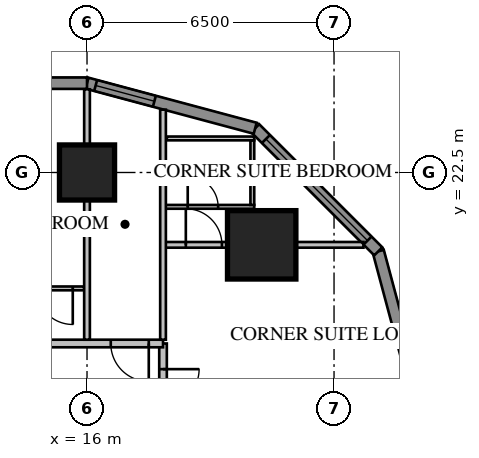
"""IFC4 building model, lengths in metres.
Left out: names, types, materials, properties, quantities, classifications, styles, units other than length and angle.
Written with IfcOpenShell. Run it as: python <this file> out.ifc"""

import sys

from ifc_helpers import new_model, si_unit, direction, frame, frame_2d, origin, origin_2d, place, context, subcontext, project, spatial, rectangle, extrude, element, fill, save


model = new_model("IFC4")
c1 = context("Model", 3, precision=1e-05, world=origin(), true_north=direction((0.0, 1.0)))
c2 = subcontext(c1, "Body", "Model", "MODEL_VIEW")
j1 = project(units=[si_unit("LENGTHUNIT", "METRE"), si_unit("PLANEANGLEUNIT", "RADIAN")], contexts=[c1])
p1 = place(None, origin())
s1 = spatial("IfcSite", under=j1, at=p1, CompositionType="ELEMENT")
p2 = place(p1, origin())
s2 = spatial("IfcBuilding", under=s1, at=p2, CompositionType="ELEMENT")
p3 = place(p2, frame((0.0, 0.0, 39.1)))
s3 = spatial("IfcBuildingStorey", under=s2, at=p3, CompositionType="ELEMENT", Elevation=39.1)
p4 = place(p3, frame((20.596, 20.596, 0.0), z_axis=(0.0, 0.0, 1.0), x_axis=(1.0, 0.0, 0.0)))
e1 = element("IfcColumn", 1, at=p4, inside=s3, PredefinedType="COLUMN", context=c2, shape_type="SweptSolid", body=[
    extrude(rectangle(XDim=1.8, YDim=1.8, at=origin_2d()), origin(), (0.0, 0.0, 1.0), 3.85),
])
p5 = place(p3, frame((16.0, 22.5, 0.0), z_axis=(0.0, 0.0, 1.0), x_axis=(1.0, 0.0, 0.0)))
e2 = element("IfcColumn", 2, at=p5, inside=s3, PredefinedType="COLUMN", context=c2, shape_type="SweptSolid", body=[
    extrude(rectangle(XDim=1.45, YDim=1.45, at=origin_2d()), origin(), (0.0, 0.0, 1.0), 3.85),
])
p6 = place(p3, frame((24.85, 16.0, 0.0), z_axis=(0.0, 0.0, 1.0), x_axis=(-0.258839972501, 0.965920218567, 0.0)))
e3 = element("IfcWall", 3, at=p6, inside=s3, PredefinedType="SOLIDWALL", context=c2, shape_type="SweptSolid", body=[
    extrude(rectangle(XDim=4.581, YDim=0.3, at=frame_2d((2.291, 0.0))), origin(), (0.0, 0.0, 1.0), 3.65),
])
p7 = place(p3, frame((23.664, 20.425, 0.0), z_axis=(0.0, 0.0, 1.0), x_axis=(-0.707106781187, 0.707106781187, 0.0)))
e4 = element("IfcWall", 4, at=p7, inside=s3, PredefinedType="SOLIDWALL", context=c2, shape_type="SweptSolid", body=[
    extrude(rectangle(XDim=4.581, YDim=0.3, at=frame_2d((2.291, 0.0))), origin(), (0.0, 0.0, 1.0), 3.65),
])
p8 = place(p7, frame((0.4, 0.0, 0.75)))
e5 = element("IfcOpeningElement", 5, at=p8, cuts=e4, PredefinedType="OPENING", context=c2, shape_type="SweptSolid", body=[
    extrude(rectangle(XDim=3.781, YDim=1.8, at=frame_2d((1.891, 0.9))), frame((0.0, 0.17, 0.0), z_axis=(0.0, -1.0, 0.0), x_axis=(1.0, 0.0, 0.0)), (0.0, 0.0, 1.0), 0.34),
])
p9 = place(p3, frame((20.425, 23.664, 0.0), z_axis=(0.0, 0.0, 1.0), x_axis=(-0.965920218567, 0.258839972501, 0.0)))
e6 = element("IfcWall", 6, at=p9, inside=s3, PredefinedType="SOLIDWALL", context=c2, shape_type="SweptSolid", body=[
    extrude(rectangle(XDim=4.581, YDim=0.3, at=frame_2d((2.291, 0.0))), origin(), (0.0, 0.0, 1.0), 3.65),
])
p10 = place(p9, frame((2.746, 0.0, 0.75)))
e7 = element("IfcOpeningElement", 7, at=p10, cuts=e6, PredefinedType="OPENING", context=c2, shape_type="SweptSolid", body=[
    extrude(rectangle(XDim=1.6, YDim=1.8, at=frame_2d((0.8, 0.9))), frame((0.0, 0.17, 0.0), z_axis=(0.0, -1.0, 0.0), x_axis=(1.0, 0.0, 0.0)), (0.0, 0.0, 1.0), 0.34),
])
p11 = place(p3, frame((16.0, 24.85, 0.0), z_axis=(0.0, 0.0, 1.0), x_axis=(-1.0, 0.0, 0.0)))
e8 = element("IfcWall", 8, at=p11, inside=s3, PredefinedType="SOLIDWALL", context=c2, shape_type="SweptSolid", body=[
    extrude(rectangle(XDim=32.0, YDim=0.3, at=frame_2d((16.0, 0.0))), origin(), (0.0, 0.0, 1.0), 3.65),
])
p12 = place(p11, frame((1.2, 0.0, 0.75)))
e9 = element("IfcOpeningElement", 9, at=p12, cuts=e8, PredefinedType="OPENING", context=c2, shape_type="SweptSolid", body=[
    extrude(rectangle(XDim=1.6, YDim=1.8, at=frame_2d((0.8, 0.9))), frame((0.0, 0.17, 0.0), z_axis=(0.0, -1.0, 0.0), x_axis=(1.0, 0.0, 0.0)), (0.0, 0.0, 1.0), 0.34),
])
p13 = place(p11, frame((5.2, 0.0, 0.75)))
e10 = element("IfcOpeningElement", 10, at=p13, cuts=e8, PredefinedType="OPENING", context=c2, shape_type="SweptSolid", body=[
    extrude(rectangle(XDim=1.6, YDim=1.8, at=frame_2d((0.8, 0.9))), frame((0.0, 0.17, 0.0), z_axis=(0.0, -1.0, 0.0), x_axis=(1.0, 0.0, 0.0)), (0.0, 0.0, 1.0), 0.34),
])
p14 = place(p11, frame((17.2, 0.0, 0.75)))
e11 = element("IfcOpeningElement", 11, at=p14, cuts=e8, PredefinedType="OPENING", context=c2, shape_type="SweptSolid", body=[
    extrude(rectangle(XDim=1.6, YDim=1.8, at=frame_2d((0.8, 0.9))), frame((0.0, 0.17, 0.0), z_axis=(0.0, -1.0, 0.0), x_axis=(1.0, 0.0, 0.0)), (0.0, 0.0, 1.0), 0.34),
])
p15 = place(p11, frame((21.2, 0.0, 0.75)))
e12 = element("IfcOpeningElement", 12, at=p15, cuts=e8, PredefinedType="OPENING", context=c2, shape_type="SweptSolid", body=[
    extrude(rectangle(XDim=1.6, YDim=1.8, at=frame_2d((0.8, 0.9))), frame((0.0, 0.17, 0.0), z_axis=(0.0, -1.0, 0.0), x_axis=(1.0, 0.0, 0.0)), (0.0, 0.0, 1.0), 0.34),
])
p16 = place(p11, frame((25.2, 0.0, 0.75)))
e13 = element("IfcOpeningElement", 13, at=p16, cuts=e8, PredefinedType="OPENING", context=c2, shape_type="SweptSolid", body=[
    extrude(rectangle(XDim=1.6, YDim=1.8, at=frame_2d((0.8, 0.9))), frame((0.0, 0.17, 0.0), z_axis=(0.0, -1.0, 0.0), x_axis=(1.0, 0.0, 0.0)), (0.0, 0.0, 1.0), 0.34),
])
p17 = place(p11, frame((29.2, 0.0, 0.75)))
e14 = element("IfcOpeningElement", 14, at=p17, cuts=e8, PredefinedType="OPENING", context=c2, shape_type="SweptSolid", body=[
    extrude(rectangle(XDim=1.6, YDim=1.8, at=frame_2d((0.8, 0.9))), frame((0.0, 0.17, 0.0), z_axis=(0.0, -1.0, 0.0), x_axis=(1.0, 0.0, 0.0)), (0.0, 0.0, 1.0), 0.34),
])
p18 = place(p11, frame((8.8, 0.0, 0.75)))
e15 = element("IfcOpeningElement", 15, at=p18, cuts=e8, PredefinedType="OPENING", context=c2, shape_type="SweptSolid", body=[
    extrude(rectangle(XDim=2.4, YDim=1.8, at=frame_2d((1.2, 0.9))), frame((0.0, 0.17, 0.0), z_axis=(0.0, -1.0, 0.0), x_axis=(1.0, 0.0, 0.0)), (0.0, 0.0, 1.0), 0.34),
])
p19 = place(p11, frame((13.812, 0.0, 0.0)))
e16 = element("IfcOpeningElement", 16, at=p19, cuts=e8, PredefinedType="OPENING", context=c2, shape_type="SweptSolid", body=[
    extrude(rectangle(XDim=1.0, YDim=2.4, at=frame_2d((0.5, 1.2))), frame((0.0, 0.17, 0.0), z_axis=(0.0, -1.0, 0.0), x_axis=(1.0, 0.0, 0.0)), (0.0, 0.0, 1.0), 0.34),
])
p20 = place(p3, frame((18.0, -18.0, 0.0), z_axis=(0.0, 0.0, 1.0), x_axis=(0.0, 1.0, 0.0)))
e17 = element("IfcWall", 17, at=p20, inside=s3, PredefinedType="PARTITIONING", context=c2, shape_type="SweptSolid", body=[
    extrude(rectangle(XDim=36.0, YDim=0.2, at=frame_2d((18.0, 0.0))), origin(), (0.0, 0.0, 1.0), 3.65),
])
p21 = place(p20, frame((10.4, 0.0, 0.0)))
e18 = element("IfcOpeningElement", 18, at=p21, cuts=e17, PredefinedType="OPENING", context=c2, shape_type="SweptSolid", body=[
    extrude(rectangle(XDim=1.0, YDim=2.1, at=frame_2d((0.5, 1.05))), frame((0.0, 0.12, 0.0), z_axis=(0.0, -1.0, 0.0), x_axis=(1.0, 0.0, 0.0)), (0.0, 0.0, 1.0), 0.24),
])
p22 = place(p20, frame((0.375, 0.0, 0.0)))
e19 = element("IfcOpeningElement", 19, at=p22, cuts=e17, PredefinedType="OPENING", context=c2, shape_type="SweptSolid", body=[
    extrude(rectangle(XDim=1.0, YDim=2.1, at=frame_2d((0.5, 1.05))), frame((0.0, 0.12, 0.0), z_axis=(0.0, -1.0, 0.0), x_axis=(1.0, 0.0, 0.0)), (0.0, 0.0, 1.0), 0.24),
])
p23 = place(p20, frame((34.375, 0.0, 0.0)))
e20 = element("IfcOpeningElement", 20, at=p23, cuts=e17, PredefinedType="OPENING", context=c2, shape_type="SweptSolid", body=[
    extrude(rectangle(XDim=0.95, YDim=2.1, at=frame_2d((0.475, 1.05))), frame((0.0, 0.12, 0.0), z_axis=(0.0, -1.0, 0.0), x_axis=(1.0, 0.0, 0.0)), (0.0, 0.0, 1.0), 0.24),
])
p24 = place(p3, frame((18.065, 21.596, 0.0), z_axis=(0.0, 0.0, 1.0), x_axis=(1.0, 0.0, 0.0)))
e21 = element("IfcWall", 21, at=p24, inside=s3, PredefinedType="PARTITIONING", context=c2, shape_type="SweptSolid", body=[
    extrude(rectangle(XDim=2.335, YDim=0.1, at=frame_2d((1.167, 0.0))), origin(), (0.0, 0.0, 1.0), 3.65),
])
p25 = place(p24, frame((0.585, 0.0, 0.0)))
e22 = element("IfcOpeningElement", 22, at=p25, cuts=e21, PredefinedType="OPENING", context=c2, shape_type="SweptSolid", body=[
    extrude(rectangle(XDim=0.8, YDim=2.1, at=frame_2d((0.4, 1.05))), frame((0.0, 0.07, 0.0), z_axis=(0.0, -1.0, 0.0), x_axis=(1.0, 0.0, 0.0)), (0.0, 0.0, 1.0), 0.14),
])
p26 = place(p3, frame((20.35, 21.646, 0.0), z_axis=(0.0, 0.0, 1.0), x_axis=(0.0, 1.0, 0.0)))
e23 = element("IfcWall", 23, at=p26, inside=s3, PredefinedType="PARTITIONING", context=c2, shape_type="SweptSolid", body=[
    extrude(rectangle(XDim=1.7, YDim=0.1, at=frame_2d((0.85, 0.0))), origin(), (0.0, 0.0, 1.0), 3.65),
])
p27 = place(p3, frame((18.1, 23.396, 0.0), z_axis=(0.0, 0.0, 1.0), x_axis=(1.0, 0.0, 0.0)))
e24 = element("IfcWall", 24, at=p27, inside=s3, PredefinedType="PARTITIONING", context=c2, shape_type="SweptSolid", body=[
    extrude(rectangle(XDim=2.3, YDim=0.1, at=frame_2d((1.15, 0.0))), origin(), (0.0, 0.0, 1.0), 3.65),
])
p28 = place(p3, frame((18.065, 20.596, 0.0), z_axis=(0.0, 0.0, 1.0), x_axis=(1.0, 0.0, 0.0)))
e25 = element("IfcWall", 25, at=p28, inside=s3, PredefinedType="PARTITIONING", context=c2, shape_type="SweptSolid", body=[
    extrude(rectangle(XDim=5.209, YDim=0.15, at=frame_2d((2.604, 0.0))), origin(), (0.0, 0.0, 1.0), 3.65),
])
p29 = place(p28, frame((0.535, 0.0, 0.0)))
e26 = element("IfcOpeningElement", 26, at=p29, cuts=e25, PredefinedType="OPENING", context=c2, shape_type="SweptSolid", body=[
    extrude(rectangle(XDim=0.95, YDim=2.1, at=frame_2d((0.475, 1.05))), frame((0.0, 0.095, 0.0), z_axis=(0.0, -1.0, 0.0), x_axis=(1.0, 0.0, 0.0)), (0.0, 0.0, 1.0), 0.19),
])
p30 = place(p3, frame((18.0, 18.0, 0.0), z_axis=(0.0, 0.0, 1.0), x_axis=(-1.0, 0.0, 0.0)))
e27 = element("IfcWall", 27, at=p30, inside=s3, PredefinedType="PARTITIONING", context=c2, shape_type="SweptSolid", body=[
    extrude(rectangle(XDim=36.0, YDim=0.2, at=frame_2d((18.0, 0.0))), origin(), (0.0, 0.0, 1.0), 3.65),
])
p31 = place(p30, frame((10.4, 0.0, 0.0)))
e28 = element("IfcOpeningElement", 28, at=p31, cuts=e27, PredefinedType="OPENING", context=c2, shape_type="SweptSolid", body=[
    extrude(rectangle(XDim=1.0, YDim=2.1, at=frame_2d((0.5, 1.05))), frame((0.0, 0.12, 0.0), z_axis=(0.0, -1.0, 0.0), x_axis=(1.0, 0.0, 0.0)), (0.0, 0.0, 1.0), 0.24),
])
p32 = place(p30, frame((0.375, 0.0, 0.0)))
e29 = element("IfcOpeningElement", 29, at=p32, cuts=e27, PredefinedType="OPENING", context=c2, shape_type="SweptSolid", body=[
    extrude(rectangle(XDim=1.0, YDim=2.1, at=frame_2d((0.5, 1.05))), frame((0.0, 0.12, 0.0), z_axis=(0.0, -1.0, 0.0), x_axis=(1.0, 0.0, 0.0)), (0.0, 0.0, 1.0), 0.24),
])
p33 = place(p30, frame((34.375, 0.0, 0.0)))
e30 = element("IfcOpeningElement", 30, at=p33, cuts=e27, PredefinedType="OPENING", context=c2, shape_type="SweptSolid", body=[
    extrude(rectangle(XDim=0.95, YDim=2.1, at=frame_2d((0.475, 1.05))), frame((0.0, 0.12, 0.0), z_axis=(0.0, -1.0, 0.0), x_axis=(1.0, 0.0, 0.0)), (0.0, 0.0, 1.0), 0.24),
])
p34 = place(p3, frame((15.925, 19.45, 0.0), z_axis=(0.0, 0.0, 1.0), x_axis=(-1.0, 0.0, 0.0)))
e31 = element("IfcWall", 31, at=p34, inside=s3, PredefinedType="PARTITIONING", context=c2, shape_type="SweptSolid", body=[
    extrude(rectangle(XDim=31.85, YDim=0.1, at=frame_2d((15.925, 0.0))), origin(), (0.0, 0.0, 1.0), 3.65),
])
p35 = place(p34, frame((10.125, 0.0, 0.0)))
e32 = element("IfcOpeningElement", 32, at=p35, cuts=e31, PredefinedType="OPENING", context=c2, shape_type="SweptSolid", body=[
    extrude(rectangle(XDim=1.0, YDim=2.1, at=frame_2d((0.5, 1.05))), frame((0.0, 0.07, 0.0), z_axis=(0.0, -1.0, 0.0), x_axis=(1.0, 0.0, 0.0)), (0.0, 0.0, 1.0), 0.14),
])
p36 = place(p34, frame((8.3, 0.0, 0.0)))
e33 = element("IfcOpeningElement", 33, at=p36, cuts=e31, PredefinedType="OPENING", context=c2, shape_type="SweptSolid", body=[
    extrude(rectangle(XDim=0.8, YDim=2.1, at=frame_2d((0.4, 1.05))), frame((0.0, 0.07, 0.0), z_axis=(0.0, -1.0, 0.0), x_axis=(1.0, 0.0, 0.0)), (0.0, 0.0, 1.0), 0.14),
])
p37 = place(p34, frame((0.3, 0.0, 0.0)))
e34 = element("IfcOpeningElement", 34, at=p37, cuts=e31, PredefinedType="OPENING", context=c2, shape_type="SweptSolid", body=[
    extrude(rectangle(XDim=0.95, YDim=2.1, at=frame_2d((0.475, 1.05))), frame((0.0, 0.07, 0.0), z_axis=(0.0, -1.0, 0.0), x_axis=(1.0, 0.0, 0.0)), (0.0, 0.0, 1.0), 0.14),
])
p38 = place(p34, frame((6.175, 0.0, 0.0)))
e35 = element("IfcOpeningElement", 35, at=p38, cuts=e31, PredefinedType="OPENING", context=c2, shape_type="SweptSolid", body=[
    extrude(rectangle(XDim=0.95, YDim=2.1, at=frame_2d((0.475, 1.05))), frame((0.0, 0.07, 0.0), z_axis=(0.0, -1.0, 0.0), x_axis=(1.0, 0.0, 0.0)), (0.0, 0.0, 1.0), 0.14),
])
p39 = place(p34, frame((16.3, 0.0, 0.0)))
e36 = element("IfcOpeningElement", 36, at=p39, cuts=e31, PredefinedType="OPENING", context=c2, shape_type="SweptSolid", body=[
    extrude(rectangle(XDim=0.95, YDim=2.1, at=frame_2d((0.475, 1.05))), frame((0.0, 0.07, 0.0), z_axis=(0.0, -1.0, 0.0), x_axis=(1.0, 0.0, 0.0)), (0.0, 0.0, 1.0), 0.14),
])
p40 = place(p34, frame((22.175, 0.0, 0.0)))
e37 = element("IfcOpeningElement", 37, at=p40, cuts=e31, PredefinedType="OPENING", context=c2, shape_type="SweptSolid", body=[
    extrude(rectangle(XDim=0.95, YDim=2.1, at=frame_2d((0.475, 1.05))), frame((0.0, 0.07, 0.0), z_axis=(0.0, -1.0, 0.0), x_axis=(1.0, 0.0, 0.0)), (0.0, 0.0, 1.0), 0.14),
])
p41 = place(p34, frame((24.3, 0.0, 0.0)))
e38 = element("IfcOpeningElement", 38, at=p41, cuts=e31, PredefinedType="OPENING", context=c2, shape_type="SweptSolid", body=[
    extrude(rectangle(XDim=0.95, YDim=2.1, at=frame_2d((0.475, 1.05))), frame((0.0, 0.07, 0.0), z_axis=(0.0, -1.0, 0.0), x_axis=(1.0, 0.0, 0.0)), (0.0, 0.0, 1.0), 0.14),
])
p42 = place(p34, frame((30.175, 0.0, 0.0)))
e39 = element("IfcOpeningElement", 39, at=p42, cuts=e31, PredefinedType="OPENING", context=c2, shape_type="SweptSolid", body=[
    extrude(rectangle(XDim=0.95, YDim=2.1, at=frame_2d((0.475, 1.05))), frame((0.0, 0.07, 0.0), z_axis=(0.0, -1.0, 0.0), x_axis=(1.0, 0.0, 0.0)), (0.0, 0.0, 1.0), 0.14),
])
p43 = place(p3, frame((18.0, 18.1, 0.0), z_axis=(0.0, 0.0, 1.0), x_axis=(0.0, 1.0, 0.0)))
e40 = element("IfcWall", 40, at=p43, inside=s3, PredefinedType="PARTITIONING", context=c2, shape_type="SweptSolid", body=[
    extrude(rectangle(XDim=6.053, YDim=0.15, at=frame_2d((3.027, 0.0))), origin(), (0.0, 0.0, 1.0), 3.65),
])
p44 = place(p3, frame((16.0, 18.1, 0.0), z_axis=(0.0, 0.0, 1.0), x_axis=(0.0, 1.0, 0.0)))
e41 = element("IfcWall", 41, at=p44, inside=s3, PredefinedType="PARTITIONING", context=c2, shape_type="SweptSolid", body=[
    extrude(rectangle(XDim=6.589, YDim=0.15, at=frame_2d((3.295, 0.0))), origin(), (0.0, 0.0, 1.0), 3.65),
])
p45 = place(p8, origin())
e42 = element("IfcWindow", 42, at=p45, inside=s3, PartitioningType="SINGLE_PANEL", PredefinedType="WINDOW", context=c2, shape_type="SweptSolid", body=[
    extrude(rectangle(XDim=3.781, YDim=1.8, at=frame_2d((1.891, 0.9))), frame((0.0, 0.03, 0.0), z_axis=(0.0, -1.0, 0.0), x_axis=(1.0, 0.0, 0.0)), (0.0, 0.0, 1.0), 0.06),
])
fill(e5, e42)
p46 = place(p10, origin())
e43 = element("IfcWindow", 43, at=p46, inside=s3, PartitioningType="SINGLE_PANEL", PredefinedType="WINDOW", context=c2, shape_type="SweptSolid", body=[
    extrude(rectangle(XDim=1.6, YDim=1.8, at=frame_2d((0.8, 0.9))), frame((0.0, 0.03, 0.0), z_axis=(0.0, -1.0, 0.0), x_axis=(1.0, 0.0, 0.0)), (0.0, 0.0, 1.0), 0.06),
])
fill(e7, e43)
p47 = place(p23, origin())
e44 = element("IfcDoor", 44, at=p47, inside=s3, OperationType="SINGLE_SWING_RIGHT", PredefinedType="DOOR", context=c2, shape_type="SweptSolid", body=[
    extrude(rectangle(XDim=0.95, YDim=2.1, at=frame_2d((0.475, 1.05))), frame((0.0, 0.025, 0.0), z_axis=(0.0, -1.0, 0.0), x_axis=(1.0, 0.0, 0.0)), (0.0, 0.0, 1.0), 0.05),
])
fill(e20, e44)
p48 = place(p25, origin())
e45 = element("IfcDoor", 45, at=p48, inside=s3, OperationType="SINGLE_SWING_LEFT", PredefinedType="DOOR", context=c2, shape_type="SweptSolid", body=[
    extrude(rectangle(XDim=0.8, YDim=2.1, at=frame_2d((0.4, 1.05))), frame((0.0, 0.025, 0.0), z_axis=(0.0, -1.0, 0.0), x_axis=(1.0, 0.0, 0.0)), (0.0, 0.0, 1.0), 0.05),
])
fill(e22, e45)
p49 = place(p29, origin())
e46 = element("IfcDoor", 46, at=p49, inside=s3, OperationType="SINGLE_SWING_LEFT", PredefinedType="DOOR", context=c2, shape_type="SweptSolid", body=[
    extrude(rectangle(XDim=0.95, YDim=2.1, at=frame_2d((0.475, 1.05))), frame((0.0, 0.025, 0.0), z_axis=(0.0, -1.0, 0.0), x_axis=(1.0, 0.0, 0.0)), (0.0, 0.0, 1.0), 0.05),
])
fill(e26, e46)
p50 = place(p32, origin())
e47 = element("IfcDoor", 47, at=p50, inside=s3, OperationType="SINGLE_SWING_LEFT", PredefinedType="DOOR", context=c2, shape_type="SweptSolid", body=[
    extrude(rectangle(XDim=1.0, YDim=2.1, at=frame_2d((0.5, 1.05))), frame((0.0, 0.025, 0.0), z_axis=(0.0, -1.0, 0.0), x_axis=(1.0, 0.0, 0.0)), (0.0, 0.0, 1.0), 0.05),
])
fill(e29, e47)
p51 = place(p37, origin())
e48 = element("IfcDoor", 48, at=p51, inside=s3, OperationType="SINGLE_SWING_LEFT", PredefinedType="DOOR", context=c2, shape_type="SweptSolid", body=[
    extrude(rectangle(XDim=0.95, YDim=2.1, at=frame_2d((0.475, 1.05))), frame((0.0, 0.025, 0.0), z_axis=(0.0, -1.0, 0.0), x_axis=(1.0, 0.0, 0.0)), (0.0, 0.0, 1.0), 0.05),
])
fill(e34, e48)
save(model, sys.argv[1])
